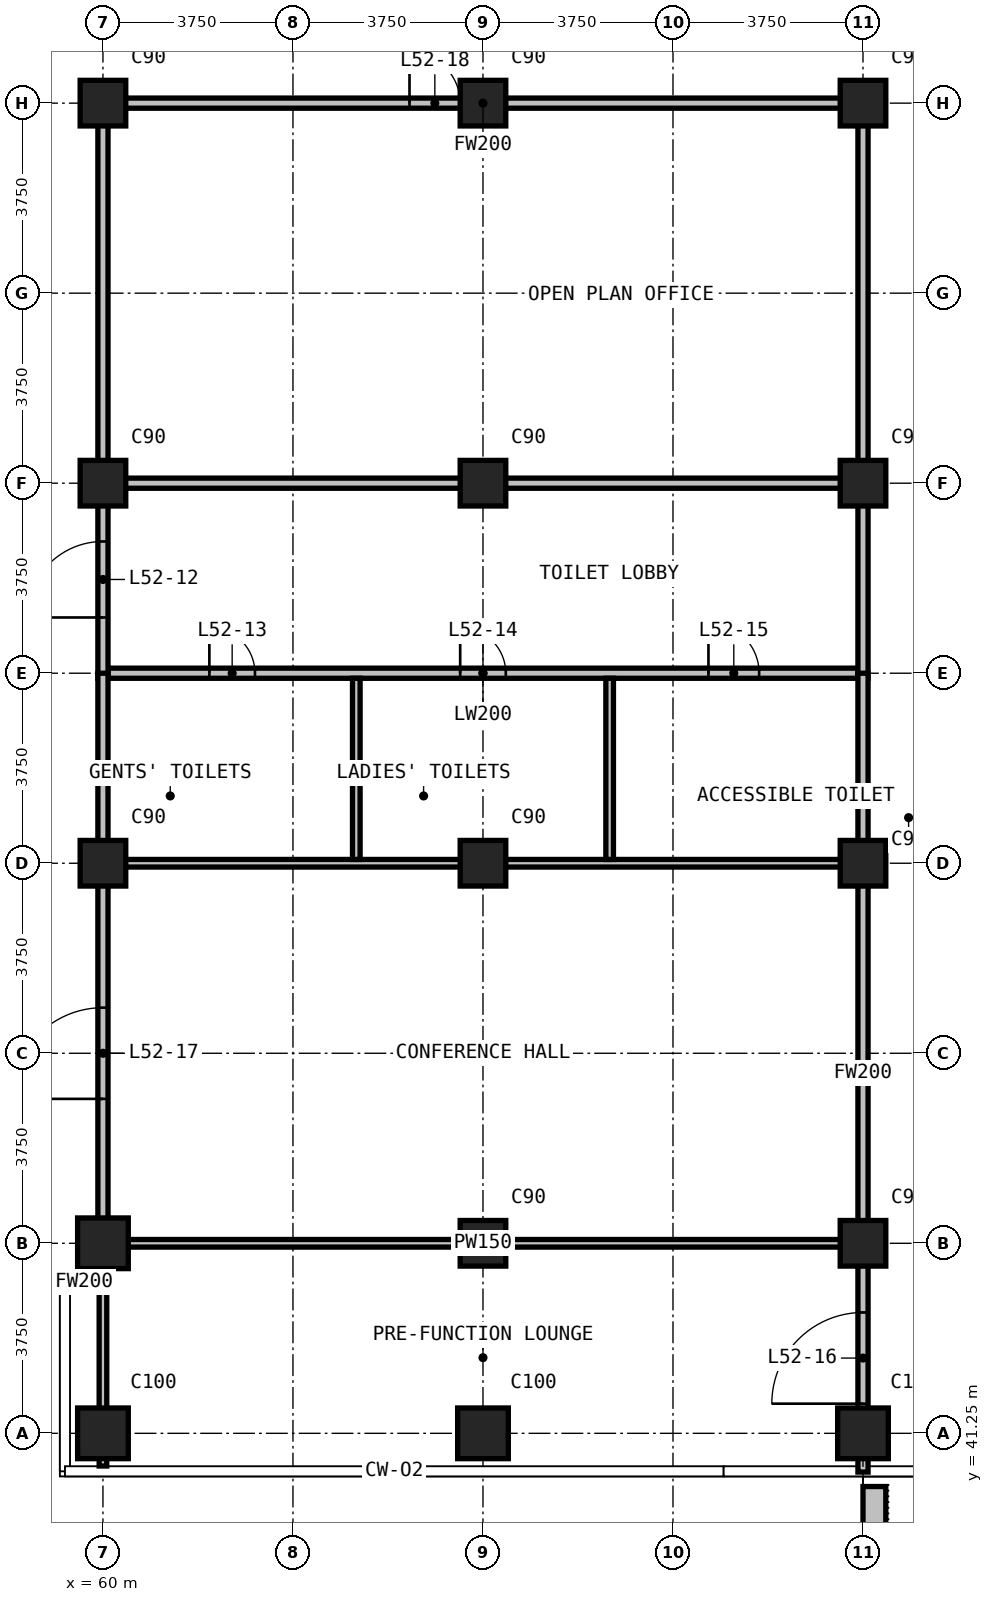
"""IFC4 building model, lengths in metres.
Left out: names, types, materials, properties, quantities, classifications, styles, units other than length and angle.
Written with IfcOpenShell. Run it as: python <this file> out.ifc"""

import sys

from ifc_helpers import new_model, si_unit, direction, frame, frame_2d, origin, origin_2d, place, context, subcontext, project, spatial, rectangle, extrude, element, fill, save


model = new_model("IFC4")
c1 = context("Model", 3, precision=1e-05, world=origin(), true_north=direction((0.0, 1.0)))
c2 = subcontext(c1, "Body", "Model", "MODEL_VIEW")
j1 = project(units=[si_unit("LENGTHUNIT", "METRE"), si_unit("PLANEANGLEUNIT", "RADIAN")], contexts=[c1])
p1 = place(None, origin())
s1 = spatial("IfcSite", under=j1, at=p1, CompositionType="ELEMENT")
p2 = place(p1, origin())
s2 = spatial("IfcBuilding", under=s1, at=p2, CompositionType="ELEMENT")
p3 = place(p2, frame((0.0, 0.0, 203.1)))
s3 = spatial("IfcBuildingStorey", under=s2, at=p3, CompositionType="ELEMENT", Elevation=203.1)
for number, where, z_axis, x_axis in (
    (1, (60.0, 41.25, 0.0), (0.0, 0.0, 1.0), (1.0, 0.0, 0.0)),
    (2, (60.0, 45.0, 0.0), (0.0, 0.0, 1.0), (1.0, 0.0, 0.0)),
):
    element("IfcColumn", number, at=place(p3, frame(where, z_axis=z_axis, x_axis=x_axis)), inside=s3, PredefinedType="COLUMN", context=c2, shape_type="SweptSolid", body=[
        extrude(rectangle(XDim=1.0, YDim=1.0, at=origin_2d()), origin(), (0.0, 0.0, 1.0), 3.6),
    ])
for number, where, z_axis, x_axis in (
    (3, (60.0, 52.5, 0.0), (0.0, 0.0, 1.0), (1.0, 0.0, 0.0)),
    (4, (60.0, 60.0, 0.0), (0.0, 0.0, 1.0), (1.0, 0.0, 0.0)),
    (5, (60.0, 67.5, 0.0), (0.0, 0.0, 1.0), (1.0, 0.0, 0.0)),
):
    element("IfcColumn", number, at=place(p3, frame(where, z_axis=z_axis, x_axis=x_axis)), inside=s3, PredefinedType="COLUMN", context=c2, shape_type="SweptSolid", body=[
        extrude(rectangle(XDim=0.9, YDim=0.9, at=origin_2d()), origin(), (0.0, 0.0, 1.0), 3.6),
    ])
p4 = place(p3, frame((67.5, 41.25, 0.0), z_axis=(0.0, 0.0, 1.0), x_axis=(1.0, 0.0, 0.0)))
e6 = element("IfcColumn", 6, at=p4, inside=s3, PredefinedType="COLUMN", context=c2, shape_type="SweptSolid", body=[
    extrude(rectangle(XDim=1.0, YDim=1.0, at=origin_2d()), origin(), (0.0, 0.0, 1.0), 3.6),
])
for number, where, z_axis, x_axis in (
    (7, (67.5, 45.0, 0.0), (0.0, 0.0, 1.0), (1.0, 0.0, 0.0)),
    (8, (67.5, 52.5, 0.0), (0.0, 0.0, 1.0), (1.0, 0.0, 0.0)),
    (9, (67.5, 60.0, 0.0), (0.0, 0.0, 1.0), (1.0, 0.0, 0.0)),
    (10, (67.5, 67.5, 0.0), (0.0, 0.0, 1.0), (1.0, 0.0, 0.0)),
):
    element("IfcColumn", number, at=place(p3, frame(where, z_axis=z_axis, x_axis=x_axis)), inside=s3, PredefinedType="COLUMN", context=c2, shape_type="SweptSolid", body=[
        extrude(rectangle(XDim=0.9, YDim=0.9, at=origin_2d()), origin(), (0.0, 0.0, 1.0), 3.6),
    ])
p5 = place(p3, frame((75.0, 41.25, 0.0), z_axis=(0.0, 0.0, 1.0), x_axis=(1.0, 0.0, 0.0)))
e11 = element("IfcColumn", 11, at=p5, inside=s3, PredefinedType="COLUMN", context=c2, shape_type="SweptSolid", body=[
    extrude(rectangle(XDim=1.0, YDim=1.0, at=origin_2d()), origin(), (0.0, 0.0, 1.0), 3.6),
])
for number, where, z_axis, x_axis in (
    (12, (75.0, 45.0, 0.0), (0.0, 0.0, 1.0), (1.0, 0.0, 0.0)),
    (13, (75.0, 52.5, 0.0), (0.0, 0.0, 1.0), (1.0, 0.0, 0.0)),
    (14, (75.0, 60.0, 0.0), (0.0, 0.0, 1.0), (1.0, 0.0, 0.0)),
    (15, (75.0, 67.5, 0.0), (0.0, 0.0, 1.0), (1.0, 0.0, 0.0)),
):
    element("IfcColumn", number, at=place(p3, frame(where, z_axis=z_axis, x_axis=x_axis)), inside=s3, PredefinedType="COLUMN", context=c2, shape_type="SweptSolid", body=[
        extrude(rectangle(XDim=0.9, YDim=0.9, at=origin_2d()), origin(), (0.0, 0.0, 1.0), 3.6),
    ])
p6 = place(p3, frame((75.225, 40.2, 0.0), z_axis=(0.0, 0.0, 1.0), x_axis=(0.0, -1.0, 0.0)))
e16 = element("IfcWall", 16, at=p6, inside=s3, PredefinedType="USERDEFINED", context=c2, shape_type="SweptSolid", body=[
    extrude(rectangle(XDim=2.35, YDim=0.45, at=frame_2d((1.175, 0.0))), origin(), (0.0, 0.0, 1.0), 1.1),
])
p7 = place(p3, frame((60.1, 56.25, 0.0), z_axis=(0.0, 0.0, 1.0), x_axis=(1.0, 0.0, 0.0)))
e17 = element("IfcWall", 17, at=p7, inside=s3, PredefinedType="PARTITIONING", context=c2, shape_type="SweptSolid", body=[
    extrude(rectangle(XDim=14.8, YDim=0.2, at=frame_2d((7.4, 0.0))), origin(), (0.0, 0.0, 1.0), 3.3),
])
p8 = place(p7, frame((2.0, 0.0, 0.0)))
e18 = element("IfcOpeningElement", 18, at=p8, cuts=e17, PredefinedType="OPENING", context=c2, shape_type="SweptSolid", body=[
    extrude(rectangle(XDim=0.9, YDim=2.2, at=frame_2d((0.45, 1.1))), frame((0.0, 0.11, 0.0), z_axis=(0.0, -1.0, 0.0), x_axis=(1.0, 0.0, 0.0)), (0.0, 0.0, 1.0), 0.22),
])
p9 = place(p7, frame((6.95, 0.0, 0.0)))
e19 = element("IfcOpeningElement", 19, at=p9, cuts=e17, PredefinedType="OPENING", context=c2, shape_type="SweptSolid", body=[
    extrude(rectangle(XDim=0.9, YDim=2.2, at=frame_2d((0.45, 1.1))), frame((0.0, 0.11, 0.0), z_axis=(0.0, -1.0, 0.0), x_axis=(1.0, 0.0, 0.0)), (0.0, 0.0, 1.0), 0.22),
])
p10 = place(p7, frame((11.85, 0.0, 0.0)))
e20 = element("IfcOpeningElement", 20, at=p10, cuts=e17, PredefinedType="OPENING", context=c2, shape_type="SweptSolid", body=[
    extrude(rectangle(XDim=1.0, YDim=2.2, at=frame_2d((0.5, 1.1))), frame((0.0, 0.11, 0.0), z_axis=(0.0, -1.0, 0.0), x_axis=(1.0, 0.0, 0.0)), (0.0, 0.0, 1.0), 0.22),
])
p11 = place(p3, frame((60.1, 60.0, 0.0), z_axis=(0.0, 0.0, 1.0), x_axis=(1.0, 0.0, 0.0)))
e21 = element("IfcWall", 21, at=p11, inside=s3, PredefinedType="PARTITIONING", context=c2, shape_type="SweptSolid", body=[
    extrude(rectangle(XDim=14.8, YDim=0.2, at=frame_2d((7.4, 0.0))), origin(), (0.0, 0.0, 1.0), 3.3),
])
p12 = place(p3, frame((60.0, 56.15, 0.0), z_axis=(0.0, 0.0, 1.0), x_axis=(0.0, 1.0, 0.0)))
e22 = element("IfcWall", 22, at=p12, inside=s3, PredefinedType="PARTITIONING", context=c2, shape_type="SweptSolid", body=[
    extrude(rectangle(XDim=3.95, YDim=0.2, at=frame_2d((1.975, 0.0))), origin(), (0.0, 0.0, 1.0), 3.3),
])
p13 = place(p12, frame((1.2, 0.0, 0.0)))
e23 = element("IfcOpeningElement", 23, at=p13, cuts=e22, PredefinedType="OPENING", context=c2, shape_type="SweptSolid", body=[
    extrude(rectangle(XDim=1.5, YDim=2.2, at=frame_2d((0.75, 1.1))), frame((0.0, 0.11, 0.0), z_axis=(0.0, -1.0, 0.0), x_axis=(1.0, 0.0, 0.0)), (0.0, 0.0, 1.0), 0.22),
])
p14 = place(p3, frame((75.0, 56.15, 0.0), z_axis=(0.0, 0.0, 1.0), x_axis=(0.0, 1.0, 0.0)))
e24 = element("IfcWall", 24, at=p14, inside=s3, PredefinedType="PARTITIONING", context=c2, shape_type="SweptSolid", body=[
    extrude(rectangle(XDim=3.95, YDim=0.2, at=frame_2d((1.975, 0.0))), origin(), (0.0, 0.0, 1.0), 3.3),
])
p15 = place(p3, frame((59.355, 44.235, 0.0), z_axis=(0.0, 0.0, 1.0), x_axis=(1.0, 0.0, 0.0)))
e25 = element("IfcWall", 25, at=p15, inside=s3, PredefinedType="PARTITIONING", context=c2, shape_type="SweptSolid", body=[
    extrude(rectangle(XDim=0.545, YDim=0.2, at=frame_2d((0.272, 0.0))), origin(), (0.0, 0.0, 1.0), 3.3),
])
p16 = place(p3, frame((60.1, 67.5, 0.0), z_axis=(0.0, 0.0, 1.0), x_axis=(1.0, 0.0, 0.0)))
e26 = element("IfcWall", 26, at=p16, inside=s3, PredefinedType="PARTITIONING", context=c2, shape_type="SweptSolid", body=[
    extrude(rectangle(XDim=14.8, YDim=0.2, at=frame_2d((7.4, 0.0))), origin(), (0.0, 0.0, 1.0), 3.3),
])
p17 = place(p16, frame((5.95, 0.0, 0.0)))
e27 = element("IfcOpeningElement", 27, at=p17, cuts=e26, PredefinedType="OPENING", context=c2, shape_type="SweptSolid", body=[
    extrude(rectangle(XDim=1.0, YDim=2.2, at=frame_2d((0.5, 1.1))), frame((0.0, 0.11, 0.0), z_axis=(0.0, -1.0, 0.0), x_axis=(1.0, 0.0, 0.0)), (0.0, 0.0, 1.0), 0.22),
])
p18 = place(p3, frame((60.0, 44.135, 0.0), z_axis=(0.0, 0.0, 1.0), x_axis=(0.0, 1.0, 0.0)))
e28 = element("IfcWall", 28, at=p18, inside=s3, PredefinedType="PARTITIONING", context=c2, shape_type="SweptSolid", body=[
    extrude(rectangle(XDim=12.115, YDim=0.2, at=frame_2d((6.058, 0.0))), origin(), (0.0, 0.0, 1.0), 3.3),
])
p19 = place(p18, frame((3.715, 0.0, 0.0)))
e29 = element("IfcOpeningElement", 29, at=p19, cuts=e28, PredefinedType="OPENING", context=c2, shape_type="SweptSolid", body=[
    extrude(rectangle(XDim=1.8, YDim=2.2, at=frame_2d((0.9, 1.1))), frame((0.0, 0.11, 0.0), z_axis=(0.0, -1.0, 0.0), x_axis=(1.0, 0.0, 0.0)), (0.0, 0.0, 1.0), 0.22),
])
p20 = place(p3, frame((60.0, 60.0, 0.0), z_axis=(0.0, 0.0, 1.0), x_axis=(0.0, 1.0, 0.0)))
e30 = element("IfcWall", 30, at=p20, inside=s3, PredefinedType="PARTITIONING", context=c2, shape_type="SweptSolid", body=[
    extrude(rectangle(XDim=7.6, YDim=0.2, at=frame_2d((3.8, 0.0))), origin(), (0.0, 0.0, 1.0), 3.3),
])
p21 = place(p3, frame((75.0, 40.485, 0.0), z_axis=(0.0, 0.0, 1.0), x_axis=(0.0, 1.0, 0.0)))
e31 = element("IfcWall", 31, at=p21, inside=s3, PredefinedType="PARTITIONING", context=c2, shape_type="SweptSolid", body=[
    extrude(rectangle(XDim=15.765, YDim=0.2, at=frame_2d((7.882, 0.0))), origin(), (0.0, 0.0, 1.0), 3.3),
])
p22 = place(p21, frame((1.35, 0.0, 0.0)))
e32 = element("IfcOpeningElement", 32, at=p22, cuts=e31, PredefinedType="OPENING", context=c2, shape_type="SweptSolid", body=[
    extrude(rectangle(XDim=1.8, YDim=2.2, at=frame_2d((0.9, 1.1))), frame((0.0, 0.11, 0.0), z_axis=(0.0, -1.0, 0.0), x_axis=(1.0, 0.0, 0.0)), (0.0, 0.0, 1.0), 0.22),
])
p23 = place(p3, frame((75.0, 60.0, 0.0), z_axis=(0.0, 0.0, 1.0), x_axis=(0.0, 1.0, 0.0)))
e33 = element("IfcWall", 33, at=p23, inside=s3, PredefinedType="PARTITIONING", context=c2, shape_type="SweptSolid", body=[
    extrude(rectangle(XDim=7.6, YDim=0.2, at=frame_2d((3.8, 0.0))), origin(), (0.0, 0.0, 1.0), 3.3),
])
for number, where, z_axis, x_axis in (
    (34, (60.1, 45.0, 0.0), (0.0, 0.0, 1.0), (1.0, 0.0, 0.0)),
    (35, (60.1, 52.5, 0.0), (0.0, 0.0, 1.0), (1.0, 0.0, 0.0)),
):
    element("IfcWall", number, at=place(p3, frame(where, z_axis=z_axis, x_axis=x_axis)), inside=s3, PredefinedType="PARTITIONING", context=c2, shape_type="SweptSolid", body=[
        extrude(rectangle(XDim=14.8, YDim=0.15, at=frame_2d((7.4, 0.0))), origin(), (0.0, 0.0, 1.0), 3.3),
    ])
p24 = place(p3, frame((60.0, 40.605, 0.0), z_axis=(0.0, 0.0, 1.0), x_axis=(0.0, 1.0, 0.0)))
e36 = element("IfcWall", 36, at=p24, inside=s3, PredefinedType="PARTITIONING", context=c2, shape_type="SweptSolid", body=[
    extrude(rectangle(XDim=3.6, YDim=0.15, at=frame_2d((1.8, 0.0))), origin(), (0.0, 0.0, 1.0), 3.3),
])
for number, where, z_axis, x_axis in (
    (37, (65.0, 52.575, 0.0), (0.0, 0.0, 1.0), (0.0, 1.0, 0.0)),
    (38, (70.0, 52.575, 0.0), (0.0, 0.0, 1.0), (0.0, 1.0, 0.0)),
):
    element("IfcWall", number, at=place(p3, frame(where, z_axis=z_axis, x_axis=x_axis)), inside=s3, PredefinedType="PARTITIONING", context=c2, shape_type="SweptSolid", body=[
        extrude(rectangle(XDim=3.575, YDim=0.15, at=frame_2d((1.788, 0.0))), origin(), (0.0, 0.0, 1.0), 3.3),
    ])
p25 = place(p13, origin())
e39 = element("IfcDoor", 39, at=p25, inside=s3, OperationType="DOUBLE_DOOR_SINGLE_SWING", PredefinedType="DOOR", context=c2, shape_type="SweptSolid", body=[
    extrude(rectangle(XDim=1.5, YDim=2.2, at=frame_2d((0.75, 1.1))), frame((0.0, 0.025, 0.0), z_axis=(0.0, -1.0, 0.0), x_axis=(1.0, 0.0, 0.0)), (0.0, 0.0, 1.0), 0.05),
])
fill(e23, e39)
p26 = place(p8, origin())
e40 = element("IfcDoor", 40, at=p26, inside=s3, OperationType="SINGLE_SWING_RIGHT", PredefinedType="DOOR", context=c2, shape_type="SweptSolid", body=[
    extrude(rectangle(XDim=0.9, YDim=2.2, at=frame_2d((0.45, 1.1))), frame((0.0, 0.025, 0.0), z_axis=(0.0, -1.0, 0.0), x_axis=(1.0, 0.0, 0.0)), (0.0, 0.0, 1.0), 0.05),
])
fill(e18, e40)
p27 = place(p9, origin())
e41 = element("IfcDoor", 41, at=p27, inside=s3, OperationType="SINGLE_SWING_RIGHT", PredefinedType="DOOR", context=c2, shape_type="SweptSolid", body=[
    extrude(rectangle(XDim=0.9, YDim=2.2, at=frame_2d((0.45, 1.1))), frame((0.0, 0.025, 0.0), z_axis=(0.0, -1.0, 0.0), x_axis=(1.0, 0.0, 0.0)), (0.0, 0.0, 1.0), 0.05),
])
fill(e19, e41)
p28 = place(p10, origin())
e42 = element("IfcDoor", 42, at=p28, inside=s3, OperationType="SINGLE_SWING_RIGHT", PredefinedType="DOOR", context=c2, shape_type="SweptSolid", body=[
    extrude(rectangle(XDim=1.0, YDim=2.2, at=frame_2d((0.5, 1.1))), frame((0.0, 0.025, 0.0), z_axis=(0.0, -1.0, 0.0), x_axis=(1.0, 0.0, 0.0)), (0.0, 0.0, 1.0), 0.05),
])
fill(e20, e42)
p29 = place(p22, origin())
e43 = element("IfcDoor", 43, at=p29, inside=s3, OperationType="DOUBLE_DOOR_SINGLE_SWING", PredefinedType="DOOR", context=c2, shape_type="SweptSolid", body=[
    extrude(rectangle(XDim=1.8, YDim=2.2, at=frame_2d((0.9, 1.1))), frame((0.0, 0.025, 0.0), z_axis=(0.0, -1.0, 0.0), x_axis=(1.0, 0.0, 0.0)), (0.0, 0.0, 1.0), 0.05),
])
fill(e32, e43)
p30 = place(p19, origin())
e44 = element("IfcDoor", 44, at=p30, inside=s3, OperationType="DOUBLE_DOOR_SINGLE_SWING", PredefinedType="DOOR", context=c2, shape_type="SweptSolid", body=[
    extrude(rectangle(XDim=1.8, YDim=2.2, at=frame_2d((0.9, 1.1))), frame((0.0, 0.025, 0.0), z_axis=(0.0, -1.0, 0.0), x_axis=(1.0, 0.0, 0.0)), (0.0, 0.0, 1.0), 0.05),
])
fill(e29, e44)
p31 = place(p17, origin())
e45 = element("IfcDoor", 45, at=p31, inside=s3, OperationType="SINGLE_SWING_RIGHT", PredefinedType="DOOR", context=c2, shape_type="SweptSolid", body=[
    extrude(rectangle(XDim=1.0, YDim=2.2, at=frame_2d((0.5, 1.1))), frame((0.0, 0.025, 0.0), z_axis=(0.0, -1.0, 0.0), x_axis=(1.0, 0.0, 0.0)), (0.0, 0.0, 1.0), 0.05),
])
fill(e27, e45)
save(model, sys.argv[1])
